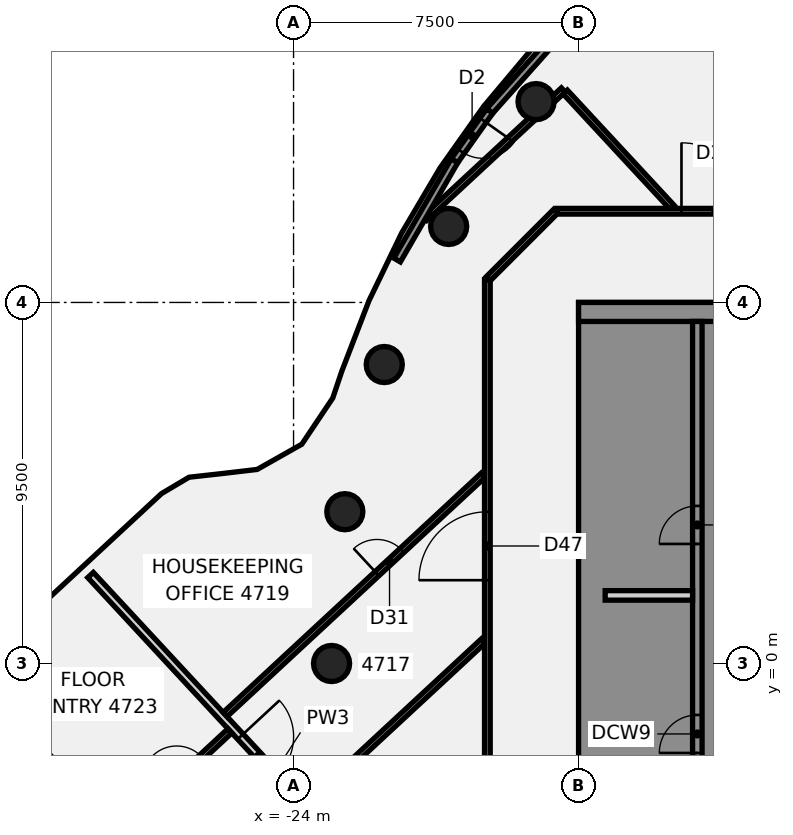
"""IFC4 building model, lengths in metres.
Left out: names, types, materials, properties, quantities, classifications, styles, units other than length and angle.
Written with IfcOpenShell. Run it as: python <this file> out.ifc"""

import sys

from ifc_helpers import new_model, si_unit, direction, frame, frame_2d, origin, origin_2d, place, context, subcontext, project, spatial, polyline, rectangle, circle, outline, extrude, element, fill, save


model = new_model("IFC4")
c1 = context("Model", 3, precision=1e-05, world=origin(), true_north=direction((0.0, 1.0)))
c2 = subcontext(c1, "Body", "Model", "MODEL_VIEW")
j1 = project(units=[si_unit("LENGTHUNIT", "METRE"), si_unit("PLANEANGLEUNIT", "RADIAN")], contexts=[c1])
p1 = place(None, origin())
s1 = spatial("IfcSite", under=j1, at=p1, CompositionType="ELEMENT")
p2 = place(p1, origin())
s2 = spatial("IfcBuilding", under=s1, at=p2, CompositionType="ELEMENT")
p3 = place(p2, frame((0.0, 0.0, 189.7)))
s3 = spatial("IfcBuildingStorey", under=s2, at=p3, CompositionType="ELEMENT", Elevation=189.7)
for number, where, z_axis, x_axis in (
    (1, (-17.619, 14.784, -0.14), (0.0, 0.0, 1.0), (1.0, 0.0, 0.0)),
    (2, (-19.919, 11.5, -0.14), (0.0, 0.0, 1.0), (1.0, 0.0, 0.0)),
    (3, (-21.613, 7.866, -0.14), (0.0, 0.0, 1.0), (1.0, 0.0, 0.0)),
    (4, (-22.651, 3.994, -0.14), (0.0, 0.0, 1.0), (1.0, 0.0, 0.0)),
    (5, (-23.0, 0.0, -0.14), (0.0, 0.0, 1.0), (1.0, 0.0, 0.0)),
):
    element("IfcColumn", number, at=place(p3, frame(where, z_axis=z_axis, x_axis=x_axis)), inside=s3, PredefinedType="COLUMN", context=c2, shape_type="SweptSolid", body=[
        extrude(circle(Radius=0.475, at=origin_2d()), origin(), (0.0, 0.0, 1.0), 3.6),
    ])
p4 = place(p3, frame((-29.342, 2.328, 0.0), z_axis=(0.0, 0.0, 1.0), x_axis=(0.679974811844, -0.73323547054, 0.0)))
e6 = element("IfcWall", 6, at=p4, inside=s3, PredefinedType="PARTITIONING", context=c2, shape_type="SweptSolid", body=[
    extrude(rectangle(XDim=14.219, YDim=0.2, at=frame_2d((7.11, 0.0))), origin(), (0.0, 0.0, 1.0), 2.864),
])
p5 = place(p4, frame((5.8, 0.0, 0.0)))
e7 = element("IfcOpeningElement", 7, at=p5, cuts=e6, PredefinedType="OPENING", context=c2, shape_type="SweptSolid", body=[
    extrude(rectangle(XDim=1.4, YDim=2.1, at=frame_2d((0.7, 1.05))), frame((0.0, 0.11, 0.0), z_axis=(0.0, -1.0, 0.0), x_axis=(1.0, 0.0, 0.0)), (0.0, 0.0, 1.0), 0.22),
])
p6 = place(p3, frame((-16.85, 15.037, 0.0), z_axis=(0.0, 0.0, 1.0), x_axis=(0.67983906824, -0.733361330651, 0.0)))
e8 = element("IfcWall", 8, at=p6, inside=s3, PredefinedType="PARTITIONING", context=c2, shape_type="SweptSolid", body=[
    extrude(rectangle(XDim=4.133, YDim=0.15, at=frame_2d((2.066, 0.0))), origin(), (0.0, 0.0, 1.0), 2.864),
])
p7 = place(p3, frame((-17.065, 11.9, 0.0), z_axis=(0.0, 0.0, 1.0), x_axis=(1.0, 0.0, 0.0)))
e9 = element("IfcWall", 9, at=p7, inside=s3, PredefinedType="PARTITIONING", context=c2, shape_type="SweptSolid", body=[
    extrude(rectangle(XDim=34.165, YDim=0.15, at=frame_2d((17.083, 0.0))), origin(), (0.0, 0.0, 1.0), 2.864),
])
p8 = place(p7, frame((24.698, 0.0, 0.0)))
e10 = element("IfcOpeningElement", 10, at=p8, cuts=e9, PredefinedType="OPENING", context=c2, shape_type="SweptSolid", body=[
    extrude(rectangle(XDim=1.8, YDim=2.1, at=frame_2d((0.9, 1.05))), frame((0.0, 0.085, 0.0), z_axis=(0.0, -1.0, 0.0), x_axis=(1.0, 0.0, 0.0)), (0.0, 0.0, 1.0), 0.17),
])
p9 = place(p7, frame((8.673, 0.0, 0.0)))
e11 = element("IfcOpeningElement", 11, at=p9, cuts=e9, PredefinedType="OPENING", context=c2, shape_type="SweptSolid", body=[
    extrude(rectangle(XDim=1.8, YDim=2.1, at=frame_2d((0.9, 1.05))), frame((0.0, 0.085, 0.0), z_axis=(0.0, -1.0, 0.0), x_axis=(1.0, 0.0, 0.0)), (0.0, 0.0, 1.0), 0.17),
])
p10 = place(p7, frame((3.273, 0.0, 0.0)))
e12 = element("IfcOpeningElement", 12, at=p10, cuts=e9, PredefinedType="OPENING", context=c2, shape_type="SweptSolid", body=[
    extrude(rectangle(XDim=1.8, YDim=2.1, at=frame_2d((0.9, 1.05))), frame((0.0, 0.085, 0.0), z_axis=(0.0, -1.0, 0.0), x_axis=(1.0, 0.0, 0.0)), (0.0, 0.0, 1.0), 0.17),
])
p11 = place(p3, frame((-28.506, -4.396, 0.0), z_axis=(0.0, 0.0, 1.0), x_axis=(0.733324917734, 0.679878345758, 0.0)))
e13 = element("IfcWall", 13, at=p11, inside=s3, PredefinedType="PARTITIONING", context=c2, shape_type="SweptSolid", body=[
    extrude(rectangle(XDim=3.86, YDim=0.15, at=frame_2d((1.93, 0.0))), origin(), (0.0, 0.0, 1.0), 2.864),
])
p12 = place(p11, frame((1.95, 0.0, 0.0)))
e14 = element("IfcOpeningElement", 14, at=p12, cuts=e13, PredefinedType="OPENING", context=c2, shape_type="SweptSolid", body=[
    extrude(rectangle(XDim=0.9, YDim=2.1, at=frame_2d((0.45, 1.05))), frame((0.0, 0.085, 0.0), z_axis=(0.0, -1.0, 0.0), x_axis=(1.0, 0.0, 0.0)), (0.0, 0.0, 1.0), 0.17),
])
p13 = place(p3, frame((-25.801, -1.342, 0.0), z_axis=(0.0, 0.0, 1.0), x_axis=(0.733307567505, 0.679897059444, 0.0)))
e15 = element("IfcWall", 15, at=p13, inside=s3, PredefinedType="PARTITIONING", context=c2, shape_type="SweptSolid", body=[
    extrude(rectangle(XDim=9.265, YDim=0.15, at=frame_2d((4.633, 0.0))), origin(), (0.0, 0.0, 1.0), 2.864),
])
p14 = place(p13, frame((5.45, 0.0, 0.0)))
e16 = element("IfcOpeningElement", 16, at=p14, cuts=e15, PredefinedType="OPENING", context=c2, shape_type="SweptSolid", body=[
    extrude(rectangle(XDim=0.9, YDim=2.1, at=frame_2d((0.45, 1.05))), frame((0.0, 0.085, 0.0), z_axis=(0.0, -1.0, 0.0), x_axis=(1.0, 0.0, 0.0)), (0.0, 0.0, 1.0), 0.17),
])
p15 = place(p3, frame((-23.611, -3.675, 0.0), z_axis=(0.0, 0.0, 1.0), x_axis=(0.73335133344, 0.679849852351, 0.0)))
e17 = element("IfcWall", 17, at=p15, inside=s3, PredefinedType="PARTITIONING", context=c2, shape_type="SweptSolid", body=[
    extrude(rectangle(XDim=6.279, YDim=0.15, at=frame_2d((3.14, 0.0))), origin(), (0.0, 0.0, 1.0), 2.864),
])
p16 = place(p3, frame((-20.542, 11.715, 0.0), z_axis=(0.0, 0.0, 1.0), x_axis=(0.733232438966, 0.679978080858, 0.0)))
e18 = element("IfcWall", 18, at=p16, inside=s3, PredefinedType="PARTITIONING", context=c2, shape_type="SweptSolid", body=[
    extrude(rectangle(XDim=3.842, YDim=0.15, at=frame_2d((1.921, 0.0))), origin(), (0.0, 0.0, 1.0), 2.864),
])
p17 = place(p3, frame((-17.154, 14.858, 0.0), z_axis=(0.0, 0.0, 1.0), x_axis=(0.733499168144, 0.679690348859, 0.0)))
e19 = element("IfcWall", 19, at=p17, inside=s3, PredefinedType="PARTITIONING", context=c2, shape_type="SweptSolid", body=[
    extrude(rectangle(XDim=0.345, YDim=0.15, at=frame_2d((0.172, 0.0))), origin(), (0.0, 0.0, 1.0), 2.864),
])
p18 = place(p3, frame((-18.872, 10.128, 0.0), z_axis=(0.0, 0.0, 1.0), x_axis=(0.707106781187, 0.707106781187, 0.0)))
e20 = element("IfcWall", 20, at=p18, inside=s3, PredefinedType="PARTITIONING", context=c2, shape_type="SweptSolid", body=[
    extrude(rectangle(XDim=2.505, YDim=0.15, at=frame_2d((1.253, 0.0))), origin(), (0.0, 0.0, 1.0), 2.864),
])
p19 = place(p3, frame((-18.9, -10.1, 0.0), z_axis=(0.0, 0.0, 1.0), x_axis=(0.0, 1.0, 0.0)))
e21 = element("IfcWall", 21, at=p19, inside=s3, PredefinedType="PARTITIONING", context=c2, shape_type="SweptSolid", body=[
    extrude(rectangle(XDim=20.2, YDim=0.15, at=frame_2d((10.1, 0.0))), origin(), (0.0, 0.0, 1.0), 2.864),
])
p20 = place(p19, frame((12.292, 0.0, 0.0)))
e22 = element("IfcOpeningElement", 22, at=p20, cuts=e21, PredefinedType="OPENING", context=c2, shape_type="SweptSolid", body=[
    extrude(rectangle(XDim=1.8, YDim=2.1, at=frame_2d((0.9, 1.05))), frame((0.0, 0.085, 0.0), z_axis=(0.0, -1.0, 0.0), x_axis=(1.0, 0.0, 0.0)), (0.0, 0.0, 1.0), 0.17),
])
p21 = place(p19, frame((5.16, 0.0, 0.0)))
e23 = element("IfcOpeningElement", 23, at=p21, cuts=e21, PredefinedType="OPENING", context=c2, shape_type="SweptSolid", body=[
    extrude(rectangle(XDim=0.9, YDim=2.1, at=frame_2d((0.45, 1.05))), frame((0.0, 0.085, 0.0), z_axis=(0.0, -1.0, 0.0), x_axis=(1.0, 0.0, 0.0)), (0.0, 0.0, 1.0), 0.17),
])
p22 = place(p3, frame((-16.83, 16.794, 0.0), z_axis=(0.0, 0.0, 1.0), x_axis=(-0.664915269841, -0.746918793399, 0.0)))
e24 = element("IfcWall", 24, at=p22, inside=s3, PredefinedType="SOLIDWALL", context=c2, shape_type="SweptSolid", body=[
    extrude(rectangle(XDim=3.022, YDim=0.2, at=frame_2d((1.511, 0.0))), origin(), (0.0, 0.0, 1.0), 3.46),
])
p23 = place(p3, frame((-19.763, 13.231, 0.0), z_axis=(0.0, 0.0, 1.0), x_axis=(-0.500701704226, -0.865619895442, 0.0)))
e25 = element("IfcWall", 25, at=p23, inside=s3, PredefinedType="SOLIDWALL", context=c2, shape_type="SweptSolid", body=[
    extrude(rectangle(XDim=3.021, YDim=0.2, at=frame_2d((1.51, 0.0))), origin(), (0.0, 0.0, 1.0), 3.46),
])
p24 = place(p3, frame((-18.839, 14.537, 0.0), z_axis=(0.0, 0.0, 1.0), x_axis=(-0.577653217212, -0.816282280001, 0.0)))
e26 = element("IfcWall", 26, at=p24, inside=s3, PredefinedType="SOLIDWALL", context=c2, shape_type="SweptSolid", body=[
    extrude(rectangle(XDim=1.6, YDim=0.2, at=frame_2d((0.8, 0.0))), origin(), (0.0, 0.0, 1.0), 3.46),
])
p25 = place(p24, frame((0.3, 0.0, 0.0)))
e27 = element("IfcOpeningElement", 27, at=p25, cuts=e26, PredefinedType="OPENING", context=c2, shape_type="SweptSolid", body=[
    extrude(rectangle(XDim=1.0, YDim=2.4, at=frame_2d((0.5, 1.2))), frame((0.0, 0.11, 0.0), z_axis=(0.0, -1.0, 0.0), x_axis=(1.0, 0.0, 0.0)), (0.0, 0.0, 1.0), 0.22),
])
p26 = place(p3, origin())
e28 = element("IfcWall", 28, at=p26, inside=s3, PredefinedType="SHEAR", context=c2, shape_type="SweptSolid", body=[
    extrude(outline(polyline([(-13.5, -8.125), (-16.0, -8.125), (-16.0, -5.625), (-13.5, -5.625), (-13.5, -5.375), (-16.0, -5.375), (-16.0, 5.375), (-13.5, 5.375), (-13.5, 5.625), (-16.0, 5.625), (-16.0, 8.125), (-13.5, 8.125), (-13.5, 9.0), (-16.0, 9.0), (-16.5, 9.0), (-16.5, -9.0), (-16.0, -9.0), (-13.5, -9.0), (-13.5, -8.125)])), origin(), (0.0, 0.0, 1.0), 3.46),
])
p27 = place(p3, frame((-16.5, 9.25, 0.0), z_axis=(0.0, 0.0, 1.0), x_axis=(1.0, 0.0, 0.0)))
e29 = element("IfcWall", 29, at=p27, inside=s3, PredefinedType="SHEAR", context=c2, shape_type="SweptSolid", body=[
    extrude(rectangle(XDim=13.0, YDim=0.5, at=frame_2d((6.5, 0.0))), origin(), (0.0, 0.0, 1.0), 3.46),
])
p28 = place(p3, frame((-13.375, -9.0, 0.0), z_axis=(0.0, 0.0, 1.0), x_axis=(0.0, 1.0, 0.0)))
e30 = element("IfcWall", 30, at=p28, inside=s3, PredefinedType="SHEAR", context=c2, shape_type="SweptSolid", body=[
    extrude(rectangle(XDim=18.0, YDim=0.25, at=frame_2d((9.0, 0.0))), origin(), (0.0, 0.0, 1.0), 3.46),
])
p29 = place(p28, frame((1.425, 0.0, 0.0)))
e31 = element("IfcOpeningElement", 31, at=p29, cuts=e30, PredefinedType="OPENING", context=c2, shape_type="SweptSolid", body=[
    extrude(rectangle(XDim=1.4, YDim=2.1, at=frame_2d((0.7, 1.05))), frame((0.0, 0.135, 0.0), z_axis=(0.0, -1.0, 0.0), x_axis=(1.0, 0.0, 0.0)), (0.0, 0.0, 1.0), 0.27),
])
p30 = place(p28, frame((6.646, 0.0, 0.0)))
e32 = element("IfcOpeningElement", 32, at=p30, cuts=e30, PredefinedType="OPENING", context=c2, shape_type="SweptSolid", body=[
    extrude(rectangle(XDim=1.0, YDim=2.1, at=frame_2d((0.5, 1.05))), frame((0.0, 0.135, 0.0), z_axis=(0.0, -1.0, 0.0), x_axis=(1.0, 0.0, 0.0)), (0.0, 0.0, 1.0), 0.27),
])
p31 = place(p28, frame((12.146, 0.0, 0.0)))
e33 = element("IfcOpeningElement", 33, at=p31, cuts=e30, PredefinedType="OPENING", context=c2, shape_type="SweptSolid", body=[
    extrude(rectangle(XDim=1.0, YDim=2.1, at=frame_2d((0.5, 1.05))), frame((0.0, 0.135, 0.0), z_axis=(0.0, -1.0, 0.0), x_axis=(1.0, 0.0, 0.0)), (0.0, 0.0, 1.0), 0.27),
])
p32 = place(p3, frame((-15.8, 1.792, 0.0), z_axis=(0.0, 0.0, 1.0), x_axis=(1.0, 0.0, 0.0)))
e34 = element("IfcWall", 34, at=p32, inside=s3, PredefinedType="PARTITIONING", context=c2, shape_type="SweptSolid", body=[
    extrude(rectangle(XDim=2.3, YDim=0.25, at=frame_2d((1.15, 0.0))), origin(), (0.0, 0.0, 1.0), 3.46),
])
p33 = place(p3, frame((-30.921, -1.998, -0.14), z_axis=(0.0, 0.0, 1.0), x_axis=(0.679938817753, -0.733268848454, 0.0)))
e35 = element("IfcWall", 35, at=p33, inside=s3, PredefinedType="SHEAR", context=c2, shape_type="SweptSolid", body=[
    extrude(rectangle(XDim=3.2, YDim=0.2, at=frame_2d((1.6, 0.0))), origin(), (0.0, 0.0, 1.0), 3.004),
])
p34 = place(p5, origin())
e36 = element("IfcDoor", 36, at=p34, inside=s3, OperationType="DOUBLE_DOOR_SINGLE_SWING", PredefinedType="DOOR", context=c2, shape_type="SweptSolid", body=[
    extrude(rectangle(XDim=1.4, YDim=2.1, at=frame_2d((0.7, 1.05))), frame((0.0, 0.025, 0.0), z_axis=(0.0, -1.0, 0.0), x_axis=(1.0, 0.0, 0.0)), (0.0, 0.0, 1.0), 0.05),
])
fill(e7, e36)
p35 = place(p10, origin())
e37 = element("IfcDoor", 37, at=p35, inside=s3, OperationType="DOUBLE_DOOR_SINGLE_SWING", PredefinedType="DOOR", context=c2, shape_type="SweptSolid", body=[
    extrude(rectangle(XDim=1.8, YDim=2.1, at=frame_2d((0.9, 1.05))), frame((0.0, 0.025, 0.0), z_axis=(0.0, -1.0, 0.0), x_axis=(1.0, 0.0, 0.0)), (0.0, 0.0, 1.0), 0.05),
])
fill(e12, e37)
p36 = place(p14, origin())
e38 = element("IfcDoor", 38, at=p36, inside=s3, OperationType="SINGLE_SWING_LEFT", PredefinedType="DOOR", context=c2, shape_type="SweptSolid", body=[
    extrude(rectangle(XDim=0.9, YDim=2.1, at=frame_2d((0.45, 1.05))), frame((0.0, 0.025, 0.0), z_axis=(0.0, -1.0, 0.0), x_axis=(1.0, 0.0, 0.0)), (0.0, 0.0, 1.0), 0.05),
])
fill(e16, e38)
p37 = place(p20, frame((1.8, 0.0, 0.0), z_axis=(0.0, 0.0, 1.0), x_axis=(-1.0, 0.0, 0.0)))
e39 = element("IfcDoor", 39, at=p37, inside=s3, OperationType="DOUBLE_DOOR_SINGLE_SWING", PredefinedType="DOOR", context=c2, shape_type="SweptSolid", body=[
    extrude(rectangle(XDim=1.8, YDim=2.1, at=frame_2d((0.9, 1.05))), frame((0.0, 0.025, 0.0), z_axis=(0.0, -1.0, 0.0), x_axis=(1.0, 0.0, 0.0)), (0.0, 0.0, 1.0), 0.05),
])
fill(e22, e39)
p38 = place(p25, origin())
e40 = element("IfcDoor", 40, at=p38, inside=s3, OperationType="SINGLE_SWING_LEFT", PredefinedType="DOOR", context=c2, shape_type="SweptSolid", body=[
    extrude(rectangle(XDim=1.0, YDim=2.4, at=frame_2d((0.5, 1.2))), frame((0.0, 0.025, 0.0), z_axis=(0.0, -1.0, 0.0), x_axis=(1.0, 0.0, 0.0)), (0.0, 0.0, 1.0), 0.05),
])
fill(e27, e40)
p39 = place(p30, origin())
e41 = element("IfcDoor", 41, at=p39, inside=s3, OperationType="SINGLE_SWING_LEFT", PredefinedType="DOOR", context=c2, shape_type="SweptSolid", body=[
    extrude(rectangle(XDim=1.0, YDim=2.1, at=frame_2d((0.5, 1.05))), frame((0.0, 0.025, 0.0), z_axis=(0.0, -1.0, 0.0), x_axis=(1.0, 0.0, 0.0)), (0.0, 0.0, 1.0), 0.05),
])
fill(e32, e41)
p40 = place(p31, origin())
e42 = element("IfcDoor", 42, at=p40, inside=s3, OperationType="SINGLE_SWING_LEFT", PredefinedType="DOOR", context=c2, shape_type="SweptSolid", body=[
    extrude(rectangle(XDim=1.0, YDim=2.1, at=frame_2d((0.5, 1.05))), frame((0.0, 0.025, 0.0), z_axis=(0.0, -1.0, 0.0), x_axis=(1.0, 0.0, 0.0)), (0.0, 0.0, 1.0), 0.05),
])
fill(e33, e42)
save(model, sys.argv[1])
